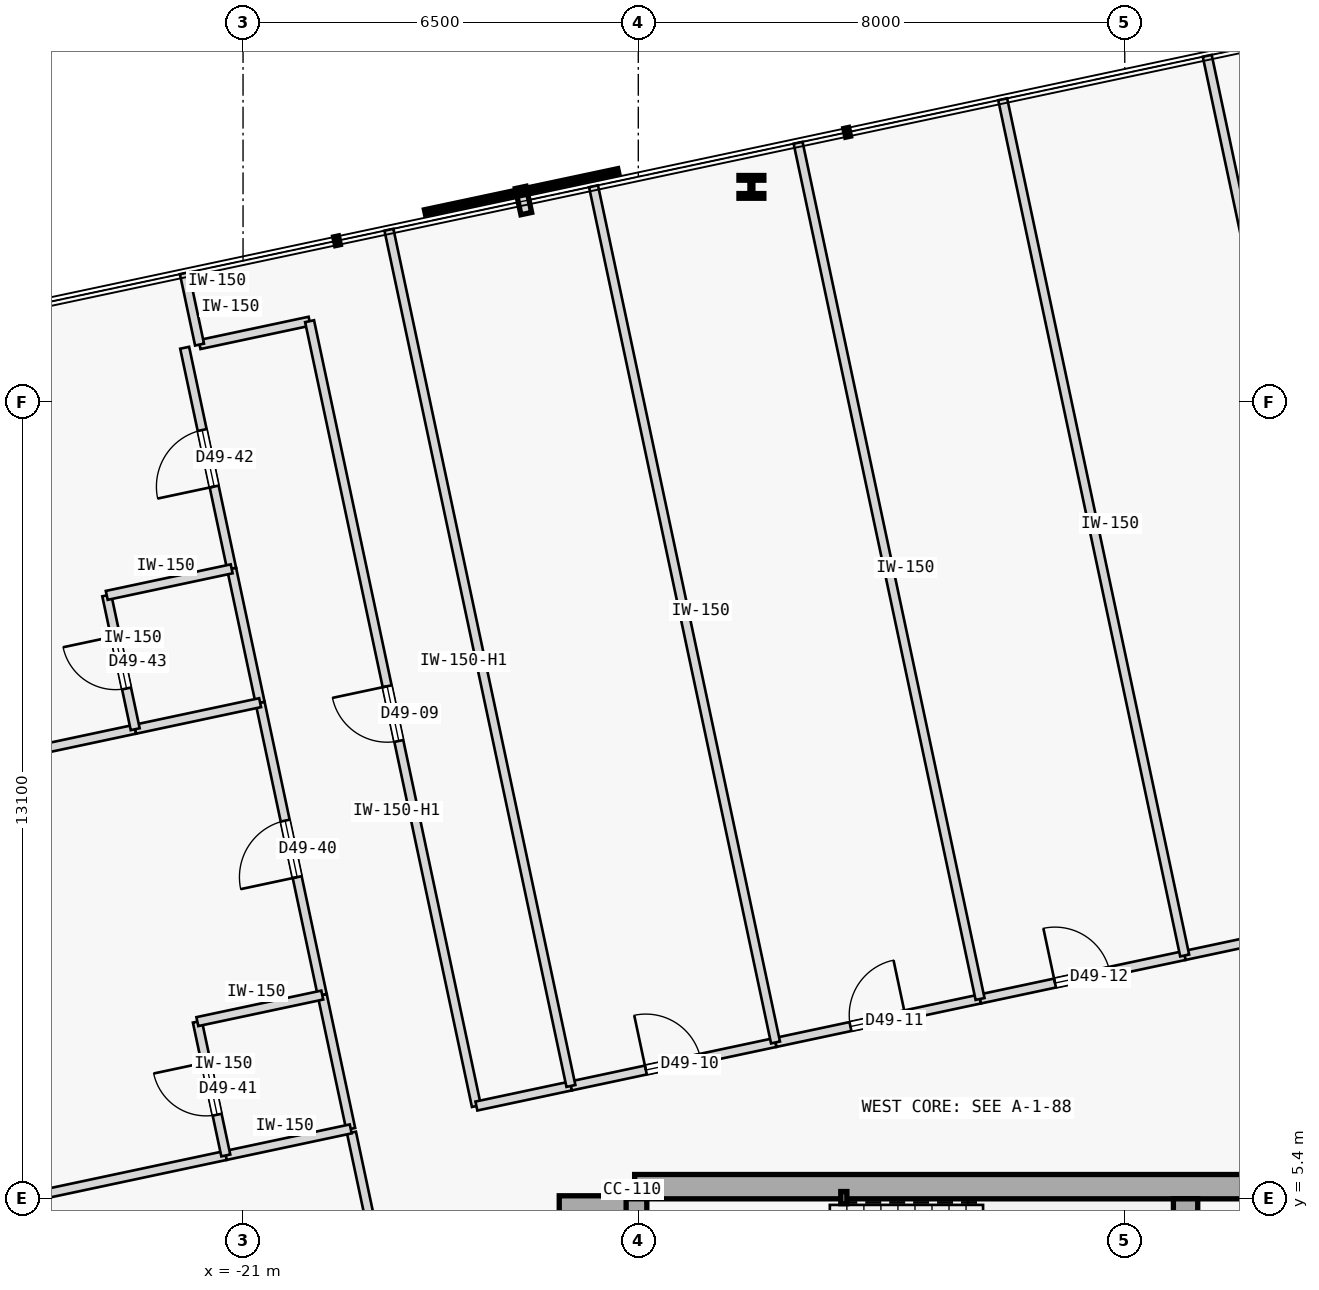
"""IFC4 building model, lengths in metres.
Left out: names, types, materials, properties, quantities, classifications, styles, units other than length and angle.
Written with IfcOpenShell. Run it as: python <this file> out.ifc"""

import sys

from ifc_helpers import new_model, si_unit, direction, frame, frame_2d, origin, origin_2d, place, context, subcontext, project, spatial, rectangle, hollow_rectangle, i_section, extrude, element, fill, save


model = new_model("IFC4")
c1 = context("Model", 3, precision=1e-05, world=origin(), true_north=direction((0.0, 1.0)))
c2 = subcontext(c1, "Body", "Model", "MODEL_VIEW")
j1 = project(units=[si_unit("LENGTHUNIT", "METRE"), si_unit("PLANEANGLEUNIT", "RADIAN")], contexts=[c1])
p1 = place(None, origin())
s1 = spatial("IfcSite", under=j1, at=p1, CompositionType="ELEMENT")
p2 = place(p1, origin())
s2 = spatial("IfcBuilding", under=s1, at=p2, CompositionType="ELEMENT")
p3 = place(p2, frame((0.0, 0.0, 188.8)))
s3 = spatial("IfcBuildingStorey", under=s2, at=p3, CompositionType="ELEMENT", Elevation=188.8)
p4 = place(p3, frame((-15.25, 4.9, 0.0), z_axis=(0.0, 0.0, 1.0), x_axis=(1.0, 0.0, 0.0)))
e1 = element("IfcColumn", 1, at=p4, inside=s3, PredefinedType="COLUMN", context=c2, shape_type="SweptSolid", body=[
    extrude(rectangle(XDim=1.1, YDim=1.1, at=origin_2d()), origin(), (0.0, 0.0, 1.0), 3.4),
])
p5 = place(p3, frame((-14.56, 5.6, 0.0), z_axis=(0.0, 0.0, 1.0), x_axis=(1.0, 0.0, 0.0)))
e2 = element("IfcWall", 2, at=p5, inside=s3, PredefinedType="SHEAR", context=c2, shape_type="SweptSolid", body=[
    extrude(rectangle(XDim=11.41, YDim=0.4, at=frame_2d((5.705, 0.0))), origin(), (0.0, 0.0, 1.0), 3.175),
])
p6 = place(p3, frame((-14.56, -5.4, 0.0), z_axis=(0.0, 0.0, 1.0), x_axis=(0.0, 1.0, 0.0)))
e3 = element("IfcWall", 3, at=p6, inside=s3, PredefinedType="SHEAR", context=c2, shape_type="SweptSolid", body=[
    extrude(rectangle(XDim=10.8, YDim=0.4, at=frame_2d((5.4, 0.0))), origin(), (0.0, 0.0, 1.0), 3.175),
])
p7 = place(p3, frame((-5.5, 2.15, 0.0), z_axis=(0.0, 0.0, 1.0), x_axis=(0.0, 1.0, 0.0)))
e4 = element("IfcWall", 4, at=p7, inside=s3, PredefinedType="SHEAR", context=c2, shape_type="SweptSolid", body=[
    extrude(rectangle(XDim=3.25, YDim=0.4, at=frame_2d((1.625, 0.0))), origin(), (0.0, 0.0, 1.0), 3.175),
])
p8 = place(p3, frame((-11.12, 5.42, 0.0), z_axis=(0.0, 0.0, 1.0), x_axis=(1.0, 0.0, 0.0)))
e5 = element("IfcColumn", 5, at=p8, inside=s3, PredefinedType="COLUMN", context=c2, shape_type="SweptSolid", body=[
    extrude(hollow_rectangle(XDim=0.1, YDim=0.2, WallThickness=0.008, at=origin_2d()), origin(), (0.0, 0.0, 1.0), 3.4),
])
p9 = place(p3, frame((-12.64, 22.042, 0.0), z_axis=(0.0, 0.0, 1.0), x_axis=(1.0, 0.0, 0.0)))
e6 = element("IfcColumn", 6, at=p9, inside=s3, PredefinedType="COLUMN", context=c2, shape_type="SweptSolid", body=[
    extrude(i_section(OverallWidth=0.409, OverallDepth=0.374, WebThickness=0.048, FlangeThickness=0.077, FilletRadius=0.015, at=origin_2d()), origin(), (0.0, 0.0, 1.0), 3.4),
])
p10 = place(p3, frame((-21.715, 19.448, 0.0), z_axis=(0.0, 0.0, 1.0), x_axis=(0.978160192495, 0.207852442415, 0.0)))
e7 = element("IfcWall", 7, at=p10, inside=s3, PredefinedType="PARTITIONING", context=c2, shape_type="SweptSolid", body=[
    extrude(rectangle(XDim=1.85, YDim=0.15, at=frame_2d((0.925, 0.0))), origin(), (0.0, 0.0, 1.0), 3.175),
])
p11 = place(p3, frame((-17.162, 6.926, 0.0), z_axis=(0.0, 0.0, 1.0), x_axis=(-0.207911421929, 0.978147657888, 0.0)))
e8 = element("IfcWall", 8, at=p11, inside=s3, PredefinedType="PARTITIONING", context=c2, shape_type="SweptSolid", body=[
    extrude(rectangle(XDim=13.195, YDim=0.15, at=frame_2d((6.598, 0.0))), origin(), (0.0, 0.0, 1.0), 2.725),
])
p12 = place(p11, frame((6.137, 0.0, 0.0)))
e9 = element("IfcOpeningElement", 9, at=p12, cuts=e8, PredefinedType="OPENING", context=c2, shape_type="SweptSolid", body=[
    extrude(rectangle(XDim=0.92, YDim=2.15, at=frame_2d((0.46, 1.075))), frame((0.0, 0.085, 0.0), z_axis=(0.0, -1.0, 0.0), x_axis=(1.0, 0.0, 0.0)), (0.0, 0.0, 1.0), 0.17),
])
p13 = place(p3, frame((-17.162, 6.926, 0.0), z_axis=(0.0, 0.0, 1.0), x_axis=(0.978120566006, 0.208038838576, 0.0)))
e10 = element("IfcWall", 10, at=p13, inside=s3, PredefinedType="PARTITIONING", context=c2, shape_type="SweptSolid", body=[
    extrude(rectangle(XDim=1.589, YDim=0.15, at=frame_2d((0.794, 0.0))), origin(), (0.0, 0.0, 1.0), 3.175),
])
p14 = place(p3, frame((-15.608, 7.256, 0.0), z_axis=(0.0, 0.0, 1.0), x_axis=(0.978154160849, 0.207880825506, 0.0)))
e11 = element("IfcWall", 11, at=p14, inside=s3, PredefinedType="PARTITIONING", context=c2, shape_type="SweptSolid", body=[
    extrude(rectangle(XDim=3.44, YDim=0.15, at=frame_2d((1.72, 0.0))), origin(), (0.0, 0.0, 1.0), 3.175),
])
p15 = place(p14, frame((1.26, 0.0, 0.0)))
e12 = element("IfcOpeningElement", 12, at=p15, cuts=e11, PredefinedType="OPENING", context=c2, shape_type="SweptSolid", body=[
    extrude(rectangle(XDim=0.92, YDim=2.15, at=frame_2d((0.46, 1.075))), frame((0.0, 0.085, 0.0), z_axis=(0.0, -1.0, 0.0), x_axis=(1.0, 0.0, 0.0)), (0.0, 0.0, 1.0), 0.17),
])
p16 = place(p3, frame((-12.243, 7.971, 0.0), z_axis=(0.0, 0.0, 1.0), x_axis=(0.978144956759, 0.207924129352, 0.0)))
e13 = element("IfcWall", 13, at=p16, inside=s3, PredefinedType="PARTITIONING", context=c2, shape_type="SweptSolid", body=[
    extrude(rectangle(XDim=3.439, YDim=0.15, at=frame_2d((1.72, 0.0))), origin(), (0.0, 0.0, 1.0), 3.175),
])
p17 = place(p16, frame((1.26, 0.0, 0.0)))
e14 = element("IfcOpeningElement", 14, at=p17, cuts=e13, PredefinedType="OPENING", context=c2, shape_type="SweptSolid", body=[
    extrude(rectangle(XDim=0.92, YDim=2.15, at=frame_2d((0.46, 1.075))), frame((0.0, 0.085, 0.0), z_axis=(0.0, -1.0, 0.0), x_axis=(1.0, 0.0, 0.0)), (0.0, 0.0, 1.0), 0.17),
])
p18 = place(p3, frame((-8.879, 8.687, 0.0), z_axis=(0.0, 0.0, 1.0), x_axis=(0.978154160849, 0.207880825506, 0.0)))
e15 = element("IfcWall", 15, at=p18, inside=s3, PredefinedType="PARTITIONING", context=c2, shape_type="SweptSolid", body=[
    extrude(rectangle(XDim=3.44, YDim=0.15, at=frame_2d((1.72, 0.0))), origin(), (0.0, 0.0, 1.0), 3.175),
])
p19 = place(p18, frame((1.26, 0.0, 0.0)))
e16 = element("IfcOpeningElement", 16, at=p19, cuts=e15, PredefinedType="OPENING", context=c2, shape_type="SweptSolid", body=[
    extrude(rectangle(XDim=0.92, YDim=2.15, at=frame_2d((0.46, 1.075))), frame((0.0, 0.085, 0.0), z_axis=(0.0, -1.0, 0.0), x_axis=(1.0, 0.0, 0.0)), (0.0, 0.0, 1.0), 0.17),
])
p20 = place(p3, frame((-5.515, 9.402, 0.0), z_axis=(0.0, 0.0, 1.0), x_axis=(0.978141887451, 0.207938567887, 0.0)))
e17 = element("IfcWall", 17, at=p20, inside=s3, PredefinedType="PARTITIONING", context=c2, shape_type="SweptSolid", body=[
    extrude(rectangle(XDim=3.439, YDim=0.15, at=frame_2d((1.719, 0.0))), origin(), (0.0, 0.0, 1.0), 3.175),
])
p21 = place(p20, frame((1.26, 0.0, 0.0)))
e18 = element("IfcOpeningElement", 18, at=p21, cuts=e17, PredefinedType="OPENING", context=c2, shape_type="SweptSolid", body=[
    extrude(rectangle(XDim=0.92, YDim=2.15, at=frame_2d((0.46, 1.075))), frame((0.0, 0.085, 0.0), z_axis=(0.0, -1.0, 0.0), x_axis=(1.0, 0.0, 0.0)), (0.0, 0.0, 1.0), 0.17),
])
p22 = place(p3, frame((-18.207, 1.74, 0.0), z_axis=(0.0, 0.0, 1.0), x_axis=(-0.20793874598, 0.97814184959, 0.0)))
e19 = element("IfcWall", 19, at=p22, inside=s3, PredefinedType="PARTITIONING", context=c2, shape_type="SweptSolid", body=[
    extrude(rectangle(XDim=4.855, YDim=0.15, at=frame_2d((2.427, 0.0))), origin(), (0.0, 0.0, 1.0), 3.175),
])
p23 = place(p22, frame((1.952, 0.0, 0.0)))
e20 = element("IfcOpeningElement", 20, at=p23, cuts=e19, PredefinedType="OPENING", context=c2, shape_type="SweptSolid", body=[
    extrude(rectangle(XDim=0.95, YDim=2.15, at=frame_2d((0.475, 1.075))), frame((0.0, 0.085, 0.0), z_axis=(0.0, -1.0, 0.0), x_axis=(1.0, 0.0, 0.0)), (0.0, 0.0, 1.0), 0.17),
])
p24 = place(p3, frame((-19.697, 8.751, 0.0), z_axis=(0.0, 0.0, 1.0), x_axis=(-0.207887265829, 0.978152792107, 0.0)))
e21 = element("IfcWall", 21, at=p24, inside=s3, PredefinedType="PARTITIONING", context=c2, shape_type="SweptSolid", body=[
    extrude(rectangle(XDim=4.916, YDim=0.15, at=frame_2d((2.458, 0.0))), origin(), (0.0, 0.0, 1.0), 3.175),
])
p25 = place(p24, frame((1.983, 0.0, 0.0)))
e22 = element("IfcOpeningElement", 22, at=p25, cuts=e21, PredefinedType="OPENING", context=c2, shape_type="SweptSolid", body=[
    extrude(rectangle(XDim=0.95, YDim=2.15, at=frame_2d((0.475, 1.075))), frame((0.0, 0.085, 0.0), z_axis=(0.0, -1.0, 0.0), x_axis=(1.0, 0.0, 0.0)), (0.0, 0.0, 1.0), 0.17),
])
p26 = place(p3, frame((-19.229, 6.55, 0.0), z_axis=(0.0, 0.0, 1.0), x_axis=(-0.207891197838, 0.978151956427, 0.0)))
e23 = element("IfcWall", 23, at=p26, inside=s3, PredefinedType="PARTITIONING", context=c2, shape_type="SweptSolid", body=[
    extrude(rectangle(XDim=2.25, YDim=0.15, at=frame_2d((1.125, 0.0))), origin(), (0.0, 0.0, 1.0), 3.175),
])
p27 = place(p3, frame((-21.187, 15.76, 0.0), z_axis=(0.0, 0.0, 1.0), x_axis=(-0.207949879289, 0.978139482745, 0.0)))
e24 = element("IfcWall", 24, at=p27, inside=s3, PredefinedType="PARTITIONING", context=c2, shape_type="SweptSolid", body=[
    extrude(rectangle(XDim=3.717, YDim=0.15, at=frame_2d((1.858, 0.0))), origin(), (0.0, 0.0, 1.0), 3.175),
])
p28 = place(p27, frame((1.384, 0.0, 0.0)))
e25 = element("IfcOpeningElement", 25, at=p28, cuts=e24, PredefinedType="OPENING", context=c2, shape_type="SweptSolid", body=[
    extrude(rectangle(XDim=0.95, YDim=2.15, at=frame_2d((0.475, 1.075))), frame((0.0, 0.085, 0.0), z_axis=(0.0, -1.0, 0.0), x_axis=(1.0, 0.0, 0.0)), (0.0, 0.0, 1.0), 0.17),
])
p29 = place(p3, frame((-20.719, 13.559, 0.0), z_axis=(0.0, 0.0, 1.0), x_axis=(-0.207891197838, 0.978151956427, 0.0)))
e26 = element("IfcWall", 26, at=p29, inside=s3, PredefinedType="PARTITIONING", context=c2, shape_type="SweptSolid", body=[
    extrude(rectangle(XDim=2.25, YDim=0.15, at=frame_2d((1.125, 0.0))), origin(), (0.0, 0.0, 1.0), 3.175),
])
p30 = place(p3, frame((-15.608, 7.256, 0.0), z_axis=(0.0, 0.0, 1.0), x_axis=(-0.207915348705, 0.978146823219, 0.0)))
e27 = element("IfcWall", 27, at=p30, inside=s3, PredefinedType="PARTITIONING", context=c2, shape_type="SweptSolid", body=[
    extrude(rectangle(XDim=14.395, YDim=0.15, at=frame_2d((7.197, 0.0))), origin(), (0.0, 0.0, 1.0), 2.725),
])
p31 = place(p3, frame((-21.715, 19.448, 0.0), z_axis=(0.0, 0.0, 1.0), x_axis=(-0.20795853359, 0.978137642823, 0.0)))
e28 = element("IfcWall", 28, at=p31, inside=s3, PredefinedType="PARTITIONING", context=c2, shape_type="SweptSolid", body=[
    extrude(rectangle(XDim=1.2, YDim=0.15, at=frame_2d((0.6, 0.0))), origin(), (0.0, 0.0, 1.0), 3.175),
])
p32 = place(p3, frame((-12.243, 7.971, 0.0), z_axis=(0.0, 0.0, 1.0), x_axis=(-0.207895672639, 0.978151005366, 0.0)))
e29 = element("IfcWall", 29, at=p32, inside=s3, PredefinedType="PARTITIONING", context=c2, shape_type="SweptSolid", body=[
    extrude(rectangle(XDim=14.395, YDim=0.15, at=frame_2d((7.198, 0.0))), origin(), (0.0, 0.0, 1.0), 3.175),
])
p33 = place(p3, frame((-8.879, 8.687, 0.0), z_axis=(0.0, 0.0, 1.0), x_axis=(-0.207915348705, 0.978146823219, 0.0)))
e30 = element("IfcWall", 30, at=p33, inside=s3, PredefinedType="PARTITIONING", context=c2, shape_type="SweptSolid", body=[
    extrude(rectangle(XDim=14.395, YDim=0.15, at=frame_2d((7.197, 0.0))), origin(), (0.0, 0.0, 1.0), 3.175),
])
p34 = place(p3, frame((-5.515, 9.402, 0.0), z_axis=(0.0, 0.0, 1.0), x_axis=(-0.207911899531, 0.97814755637, 0.0)))
e31 = element("IfcWall", 31, at=p34, inside=s3, PredefinedType="PARTITIONING", context=c2, shape_type="SweptSolid", body=[
    extrude(rectangle(XDim=14.395, YDim=0.15, at=frame_2d((7.198, 0.0))), origin(), (0.0, 0.0, 1.0), 3.175),
])
p35 = place(p3, frame((-2.151, 10.117, 0.0), z_axis=(0.0, 0.0, 1.0), x_axis=(-0.207915348705, 0.978146823219, 0.0)))
e32 = element("IfcWall", 32, at=p35, inside=s3, PredefinedType="PARTITIONING", context=c2, shape_type="SweptSolid", body=[
    extrude(rectangle(XDim=14.395, YDim=0.15, at=frame_2d((7.197, 0.0))), origin(), (0.0, 0.0, 1.0), 3.175),
])
p36 = place(p3, frame((-36.658, 2.845, 0.0), z_axis=(0.0, 0.0, 1.0), x_axis=(0.978146137903, 0.207918572776, 0.0)))
e33 = element("IfcWall", 33, at=p36, inside=s3, PredefinedType="PARTITIONING", context=c2, shape_type="SweptSolid", body=[
    extrude(rectangle(XDim=15.718, YDim=0.15, at=frame_2d((7.859, 0.0))), origin(), (0.0, 0.0, 1.0), 2.725),
])
p37 = place(p3, frame((-21.283, 6.113, 0.0), z_axis=(0.0, 0.0, 1.0), x_axis=(0.978153236239, 0.207885176084, 0.0)))
e34 = element("IfcWall", 34, at=p37, inside=s3, PredefinedType="PARTITIONING", context=c2, shape_type="SweptSolid", body=[
    extrude(rectangle(XDim=2.1, YDim=0.15, at=frame_2d((1.05, 0.0))), origin(), (0.0, 0.0, 1.0), 3.175),
])
p38 = place(p3, frame((-21.283, 6.113, 0.0), z_axis=(0.0, 0.0, 1.0), x_axis=(-0.207891197838, 0.978151956427, 0.0)))
e35 = element("IfcWall", 35, at=p38, inside=s3, PredefinedType="PARTITIONING", context=c2, shape_type="SweptSolid", body=[
    extrude(rectangle(XDim=2.25, YDim=0.15, at=frame_2d((1.125, 0.0))), origin(), (0.0, 0.0, 1.0), 3.175),
])
p39 = place(p38, frame((0.685, 0.0, 0.0)))
e36 = element("IfcOpeningElement", 36, at=p39, cuts=e35, PredefinedType="OPENING", context=c2, shape_type="SweptSolid", body=[
    extrude(rectangle(XDim=0.88, YDim=2.15, at=frame_2d((0.44, 1.075))), frame((0.0, 0.085, 0.0), z_axis=(0.0, -1.0, 0.0), x_axis=(1.0, 0.0, 0.0)), (0.0, 0.0, 1.0), 0.17),
])
p40 = place(p3, frame((-21.751, 8.314, 0.0), z_axis=(0.0, 0.0, 1.0), x_axis=(0.978153236239, 0.207885176084, 0.0)))
e37 = element("IfcWall", 37, at=p40, inside=s3, PredefinedType="PARTITIONING", context=c2, shape_type="SweptSolid", body=[
    extrude(rectangle(XDim=2.1, YDim=0.15, at=frame_2d((1.05, 0.0))), origin(), (0.0, 0.0, 1.0), 3.175),
])
p41 = place(p3, frame((-38.148, 9.855, 0.0), z_axis=(0.0, 0.0, 1.0), x_axis=(0.978146137903, 0.207918572776, 0.0)))
e38 = element("IfcWall", 38, at=p41, inside=s3, PredefinedType="PARTITIONING", context=c2, shape_type="SweptSolid", body=[
    extrude(rectangle(XDim=15.718, YDim=0.15, at=frame_2d((7.859, 0.0))), origin(), (0.0, 0.0, 1.0), 3.175),
])
p42 = place(p3, frame((-22.773, 13.123, 0.0), z_axis=(0.0, 0.0, 1.0), x_axis=(0.97815826, 0.207861536591, 0.0)))
e39 = element("IfcWall", 39, at=p42, inside=s3, PredefinedType="PARTITIONING", context=c2, shape_type="SweptSolid", body=[
    extrude(rectangle(XDim=2.1, YDim=0.15, at=frame_2d((1.05, 0.0))), origin(), (0.0, 0.0, 1.0), 3.175),
])
p43 = place(p3, frame((-22.773, 13.123, 0.0), z_axis=(0.0, 0.0, 1.0), x_axis=(-0.207913264065, 0.978147266328, 0.0)))
e40 = element("IfcWall", 40, at=p43, inside=s3, PredefinedType="PARTITIONING", context=c2, shape_type="SweptSolid", body=[
    extrude(rectangle(XDim=2.25, YDim=0.15, at=frame_2d((1.125, 0.0))), origin(), (0.0, 0.0, 1.0), 3.175),
])
p44 = place(p43, frame((0.685, 0.0, 0.0)))
e41 = element("IfcOpeningElement", 41, at=p44, cuts=e40, PredefinedType="OPENING", context=c2, shape_type="SweptSolid", body=[
    extrude(rectangle(XDim=0.88, YDim=2.15, at=frame_2d((0.44, 1.075))), frame((0.0, 0.085, 0.0), z_axis=(0.0, -1.0, 0.0), x_axis=(1.0, 0.0, 0.0)), (0.0, 0.0, 1.0), 0.17),
])
p45 = place(p3, frame((-23.241, 15.323, 0.0), z_axis=(0.0, 0.0, 1.0), x_axis=(0.978134617382, 0.207972763311, 0.0)))
e42 = element("IfcWall", 42, at=p45, inside=s3, PredefinedType="PARTITIONING", context=c2, shape_type="SweptSolid", body=[
    extrude(rectangle(XDim=2.1, YDim=0.15, at=frame_2d((1.05, 0.0))), origin(), (0.0, 0.0, 1.0), 3.175),
])
p46 = place(p12, origin())
e43 = element("IfcDoor", 43, at=p46, inside=s3, OperationType="SINGLE_SWING_RIGHT", PredefinedType="DOOR", context=c2, shape_type="SweptSolid", body=[
    extrude(rectangle(XDim=0.92, YDim=2.15, at=frame_2d((0.46, 1.075))), frame((0.0, 0.025, 0.0), z_axis=(0.0, -1.0, 0.0), x_axis=(1.0, 0.0, 0.0)), (0.0, 0.0, 1.0), 0.05),
])
fill(e9, e43)
p47 = place(p15, origin())
e44 = element("IfcDoor", 44, at=p47, inside=s3, OperationType="SINGLE_SWING_LEFT", PredefinedType="DOOR", context=c2, shape_type="SweptSolid", body=[
    extrude(rectangle(XDim=0.92, YDim=2.15, at=frame_2d((0.46, 1.075))), frame((0.0, 0.025, 0.0), z_axis=(0.0, -1.0, 0.0), x_axis=(1.0, 0.0, 0.0)), (0.0, 0.0, 1.0), 0.05),
])
fill(e12, e44)
p48 = place(p17, origin())
e45 = element("IfcDoor", 45, at=p48, inside=s3, OperationType="SINGLE_SWING_RIGHT", PredefinedType="DOOR", context=c2, shape_type="SweptSolid", body=[
    extrude(rectangle(XDim=0.92, YDim=2.15, at=frame_2d((0.46, 1.075))), frame((0.0, 0.025, 0.0), z_axis=(0.0, -1.0, 0.0), x_axis=(1.0, 0.0, 0.0)), (0.0, 0.0, 1.0), 0.05),
])
fill(e14, e45)
p49 = place(p19, origin())
e46 = element("IfcDoor", 46, at=p49, inside=s3, OperationType="SINGLE_SWING_LEFT", PredefinedType="DOOR", context=c2, shape_type="SweptSolid", body=[
    extrude(rectangle(XDim=0.92, YDim=2.15, at=frame_2d((0.46, 1.075))), frame((0.0, 0.025, 0.0), z_axis=(0.0, -1.0, 0.0), x_axis=(1.0, 0.0, 0.0)), (0.0, 0.0, 1.0), 0.05),
])
fill(e16, e46)
p50 = place(p25, origin())
e47 = element("IfcDoor", 47, at=p50, inside=s3, OperationType="SINGLE_SWING_LEFT", PredefinedType="DOOR", context=c2, shape_type="SweptSolid", body=[
    extrude(rectangle(XDim=0.95, YDim=2.15, at=frame_2d((0.475, 1.075))), frame((0.0, 0.025, 0.0), z_axis=(0.0, -1.0, 0.0), x_axis=(1.0, 0.0, 0.0)), (0.0, 0.0, 1.0), 0.05),
])
fill(e22, e47)
p51 = place(p39, origin())
e48 = element("IfcDoor", 48, at=p51, inside=s3, OperationType="SINGLE_SWING_RIGHT", PredefinedType="DOOR", context=c2, shape_type="SweptSolid", body=[
    extrude(rectangle(XDim=0.88, YDim=2.15, at=frame_2d((0.44, 1.075))), frame((0.0, 0.025, 0.0), z_axis=(0.0, -1.0, 0.0), x_axis=(1.0, 0.0, 0.0)), (0.0, 0.0, 1.0), 0.05),
])
fill(e36, e48)
p52 = place(p28, origin())
e49 = element("IfcDoor", 49, at=p52, inside=s3, OperationType="SINGLE_SWING_LEFT", PredefinedType="DOOR", context=c2, shape_type="SweptSolid", body=[
    extrude(rectangle(XDim=0.95, YDim=2.15, at=frame_2d((0.475, 1.075))), frame((0.0, 0.025, 0.0), z_axis=(0.0, -1.0, 0.0), x_axis=(1.0, 0.0, 0.0)), (0.0, 0.0, 1.0), 0.05),
])
fill(e25, e49)
p53 = place(p44, origin())
e50 = element("IfcDoor", 50, at=p53, inside=s3, OperationType="SINGLE_SWING_RIGHT", PredefinedType="DOOR", context=c2, shape_type="SweptSolid", body=[
    extrude(rectangle(XDim=0.88, YDim=2.15, at=frame_2d((0.44, 1.075))), frame((0.0, 0.025, 0.0), z_axis=(0.0, -1.0, 0.0), x_axis=(1.0, 0.0, 0.0)), (0.0, 0.0, 1.0), 0.05),
])
fill(e41, e50)
save(model, sys.argv[1])
